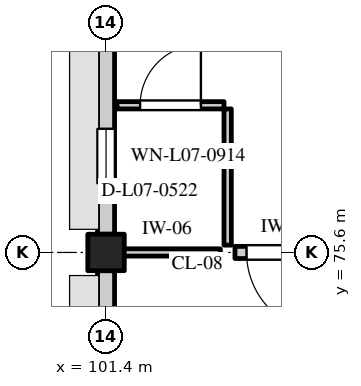
"""IFC4 building model, lengths in metres.
Left out: names, types, materials, properties, quantities, classifications, styles, units other than length and angle.
Written with IfcOpenShell. Run it as: python <this file> out.ifc"""

import sys

from ifc_helpers import new_model, si_unit, direction, frame, frame_2d, origin, origin_2d, place, context, subcontext, project, spatial, rectangle, extrude, element, fill, save


model = new_model("IFC4")
c1 = context("Model", 3, precision=1e-05, world=origin(), true_north=direction((0.0, 1.0)))
c2 = subcontext(c1, "Body", "Model", "MODEL_VIEW")
j1 = project(units=[si_unit("LENGTHUNIT", "METRE"), si_unit("PLANEANGLEUNIT", "RADIAN")], contexts=[c1])
p1 = place(None, origin())
s1 = spatial("IfcSite", under=j1, at=p1, CompositionType="ELEMENT")
p2 = place(p1, origin())
s2 = spatial("IfcBuilding", under=s1, at=p2, CompositionType="ELEMENT")
p3 = place(p2, frame((0.0, 0.0, 29.7)))
s3 = spatial("IfcBuildingStorey", under=s2, at=p3, CompositionType="ELEMENT", Elevation=29.7)
p4 = place(p3, frame((101.4, 75.6, 0.0), z_axis=(0.0, 0.0, 1.0), x_axis=(1.0, 0.0, 0.0)))
e1 = element("IfcColumn", 1, at=p4, inside=s3, PredefinedType="COLUMN", context=c2, shape_type="SweptSolid", body=[
    extrude(rectangle(XDim=0.6, YDim=0.6, at=origin_2d()), origin(), (0.0, 0.0, 1.0), 4.2),
])
p5 = place(p3, frame((101.4, 67.5, 0.0), z_axis=(0.0, 0.0, 1.0), x_axis=(0.0, 1.0, 0.0)))
e2 = element("IfcWall", 2, at=p5, inside=s3, PredefinedType="STANDARD", context=c2, shape_type="SweptSolid", body=[
    extrude(rectangle(XDim=7.8, YDim=0.28, at=frame_2d((3.9, 0.0))), origin(), (0.0, 0.0, 1.0), 3.25),
])
p6 = place(p5, frame((0.884, 0.0, 0.8)))
e3 = element("IfcOpeningElement", 3, at=p6, cuts=e2, PredefinedType="OPENING", context=c2, shape_type="SweptSolid", body=[
    extrude(rectangle(XDim=2.0, YDim=1.65, at=frame_2d((1.0, 0.825))), frame((0.0, 0.152, 0.0), z_axis=(0.0, -1.0, 0.0), x_axis=(1.0, 0.0, 0.0)), (0.0, 0.0, 1.0), 0.304),
])
p7 = place(p5, frame((4.916, 0.0, 0.8)))
e4 = element("IfcOpeningElement", 4, at=p7, cuts=e2, PredefinedType="OPENING", context=c2, shape_type="SweptSolid", body=[
    extrude(rectangle(XDim=2.0, YDim=1.65, at=frame_2d((1.0, 0.825))), frame((0.0, 0.152, 0.0), z_axis=(0.0, -1.0, 0.0), x_axis=(1.0, 0.0, 0.0)), (0.0, 0.0, 1.0), 0.304),
])
p8 = place(p3, frame((101.4, 75.9, 0.0), z_axis=(0.0, 0.0, 1.0), x_axis=(0.0, 1.0, 0.0)))
e5 = element("IfcWall", 5, at=p8, inside=s3, PredefinedType="STANDARD", context=c2, shape_type="SweptSolid", body=[
    extrude(rectangle(XDim=7.8, YDim=0.28, at=frame_2d((3.9, 0.0))), origin(), (0.0, 0.0, 1.0), 3.25),
])
p9 = place(p8, frame((0.834, 0.0, 0.8)))
e6 = element("IfcOpeningElement", 6, at=p9, cuts=e5, PredefinedType="OPENING", context=c2, shape_type="SweptSolid", body=[
    extrude(rectangle(XDim=0.9, YDim=1.3, at=frame_2d((0.45, 0.65))), frame((0.0, 0.152, 0.0), z_axis=(0.0, -1.0, 0.0), x_axis=(1.0, 0.0, 0.0)), (0.0, 0.0, 1.0), 0.304),
])
p10 = place(p8, frame((4.916, 0.0, 0.8)))
e7 = element("IfcOpeningElement", 7, at=p10, cuts=e5, PredefinedType="OPENING", context=c2, shape_type="SweptSolid", body=[
    extrude(rectangle(XDim=2.0, YDim=1.55, at=frame_2d((1.0, 0.775))), frame((0.0, 0.152, 0.0), z_axis=(0.0, -1.0, 0.0), x_axis=(1.0, 0.0, 0.0)), (0.0, 0.0, 1.0), 0.304),
])
p11 = place(p3, frame((103.52, 75.6, 0.0), z_axis=(0.0, 0.0, 1.0), x_axis=(1.0, 0.0, 0.0)))
e8 = element("IfcWall", 8, at=p11, inside=s3, PredefinedType="STANDARD", context=c2, shape_type="SweptSolid", body=[
    extrude(rectangle(XDim=1.66, YDim=0.2, at=frame_2d((0.83, 0.0))), origin(), (0.0, 0.0, 1.0), 3.25),
])
p12 = place(p11, frame((0.19, 0.0, 0.0)))
e9 = element("IfcOpeningElement", 9, at=p12, cuts=e8, PredefinedType="OPENING", context=c2, shape_type="SweptSolid", body=[
    extrude(rectangle(XDim=1.32, YDim=2.2, at=frame_2d((0.66, 1.1))), frame((0.0, 0.112, 0.0), z_axis=(0.0, -1.0, 0.0), x_axis=(1.0, 0.0, 0.0)), (0.0, 0.0, 1.0), 0.224),
])
p13 = place(p3, frame((101.52, 75.6, 0.0), z_axis=(0.0, 0.0, 1.0), x_axis=(1.0, 0.0, 0.0)))
e10 = element("IfcWall", 10, at=p13, inside=s3, PredefinedType="PARTITIONING", context=c2, shape_type="SweptSolid", body=[
    extrude(rectangle(XDim=1.76, YDim=0.12, at=frame_2d((0.88, 0.0))), origin(), (0.0, 0.0, 1.0), 3.25),
])
p14 = place(p3, frame((103.4, 75.72, 0.0), z_axis=(0.0, 0.0, 1.0), x_axis=(0.0, 1.0, 0.0)))
e11 = element("IfcWall", 11, at=p14, inside=s3, PredefinedType="PARTITIONING", context=c2, shape_type="SweptSolid", body=[
    extrude(rectangle(XDim=2.24, YDim=0.12, at=frame_2d((1.12, 0.0))), origin(), (0.0, 0.0, 1.0), 3.88),
])
p15 = place(p3, frame((101.58, 78.02, 0.0), z_axis=(0.0, 0.0, 1.0), x_axis=(1.0, 0.0, 0.0)))
e12 = element("IfcWall", 12, at=p15, inside=s3, PredefinedType="PARTITIONING", context=c2, shape_type="SweptSolid", body=[
    extrude(rectangle(XDim=1.76, YDim=0.12, at=frame_2d((0.88, 0.0))), origin(), (0.0, 0.0, 1.0), 3.88),
])
p16 = place(p15, frame((0.38, 0.0, 0.0)))
e13 = element("IfcOpeningElement", 13, at=p16, cuts=e12, PredefinedType="OPENING", context=c2, shape_type="SweptSolid", body=[
    extrude(rectangle(XDim=1.0, YDim=2.1, at=frame_2d((0.5, 1.05))), frame((0.0, 0.072, 0.0), z_axis=(0.0, -1.0, 0.0), x_axis=(1.0, 0.0, 0.0)), (0.0, 0.0, 1.0), 0.144),
])
p17 = place(p9, origin())
e14 = element("IfcWindow", 14, at=p17, inside=s3, PartitioningType="SINGLE_PANEL", PredefinedType="WINDOW", context=c2, shape_type="SweptSolid", body=[
    extrude(rectangle(XDim=0.9, YDim=1.3, at=frame_2d((0.45, 0.65))), frame((0.0, 0.03, 0.0), z_axis=(0.0, -1.0, 0.0), x_axis=(1.0, 0.0, 0.0)), (0.0, 0.0, 1.0), 0.06),
])
fill(e6, e14)
p18 = place(p12, origin())
e15 = element("IfcDoor", 15, at=p18, inside=s3, OperationType="SINGLE_SWING_RIGHT", PredefinedType="DOOR", context=c2, shape_type="SweptSolid", body=[
    extrude(rectangle(XDim=1.32, YDim=2.2, at=frame_2d((0.66, 1.1))), frame((0.0, 0.025, 0.0), z_axis=(0.0, -1.0, 0.0), x_axis=(1.0, 0.0, 0.0)), (0.0, 0.0, 1.0), 0.05),
])
fill(e9, e15)
p19 = place(p16, frame((1.0, 0.0, 0.0), z_axis=(0.0, 0.0, 1.0), x_axis=(-1.0, 0.0, 0.0)))
e16 = element("IfcDoor", 16, at=p19, inside=s3, OperationType="SINGLE_SWING_LEFT", PredefinedType="DOOR", context=c2, shape_type="SweptSolid", body=[
    extrude(rectangle(XDim=1.0, YDim=2.1, at=frame_2d((0.5, 1.05))), frame((0.0, 0.025, 0.0), z_axis=(0.0, -1.0, 0.0), x_axis=(1.0, 0.0, 0.0)), (0.0, 0.0, 1.0), 0.05),
])
fill(e13, e16)
save(model, sys.argv[1])
